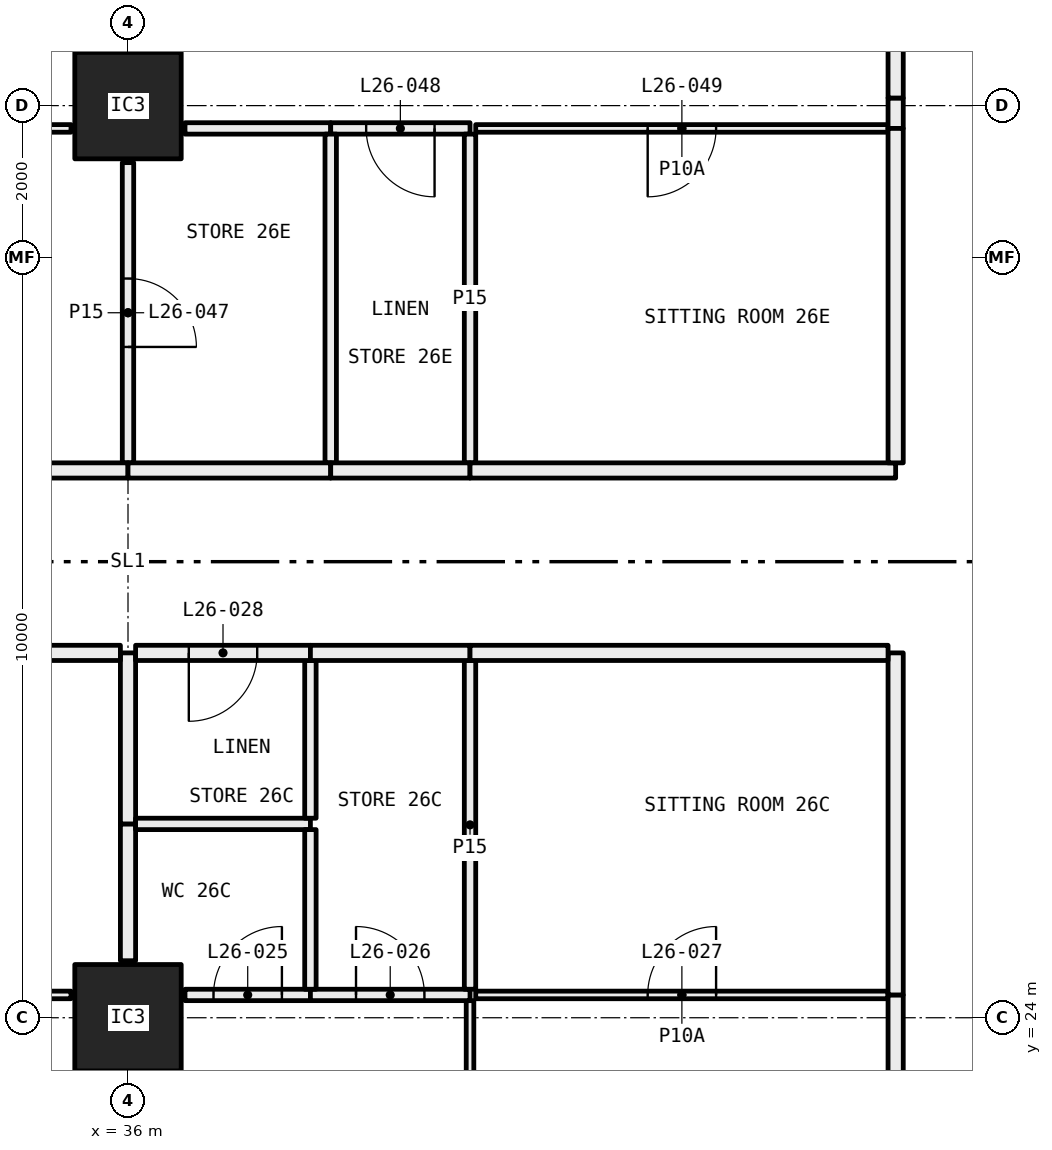
"""IFC4 building model, lengths in metres.
Left out: names, types, materials, properties, quantities, classifications, styles, units other than length and angle.
Written with IfcOpenShell. Run it as: python <this file> out.ifc"""

import sys

from ifc_helpers import new_model, si_unit, direction, frame, frame_2d, origin, origin_2d, place, context, subcontext, project, spatial, rectangle, hollow_rectangle, extrude, element, fill, save


model = new_model("IFC4")
c1 = context("Model", 3, precision=1e-05, world=origin(), true_north=direction((0.0, 1.0)))
c2 = subcontext(c1, "Body", "Model", "MODEL_VIEW")
j1 = project(units=[si_unit("LENGTHUNIT", "METRE"), si_unit("PLANEANGLEUNIT", "RADIAN")], contexts=[c1])
p1 = place(None, origin())
s1 = spatial("IfcSite", under=j1, at=p1, CompositionType="ELEMENT")
p2 = place(p1, origin())
s2 = spatial("IfcBuilding", under=s1, at=p2, CompositionType="ELEMENT")
p3 = place(p2, frame((0.0, 0.0, 103.5)))
s3 = spatial("IfcBuildingStorey", under=s2, at=p3, CompositionType="ELEMENT", Elevation=103.5)
for number, where, z_axis, x_axis in (
    (1, (36.0, 24.0, 0.0), (0.0, 0.0, 1.0), (1.0, 0.0, 0.0)),
    (2, (36.0, 36.0, 0.0), (0.0, 0.0, 1.0), (1.0, 0.0, 0.0)),
):
    element("IfcColumn", number, at=place(p3, frame(where, z_axis=z_axis, x_axis=x_axis)), inside=s3, PredefinedType="COLUMN", context=c2, shape_type="SweptSolid", body=[
        extrude(hollow_rectangle(XDim=1.4, YDim=1.4, WallThickness=0.06, at=origin_2d()), origin(), (0.0, 0.0, 1.0), 3.05),
    ])
p4 = place(p3, frame((35.25, 24.3, 0.0), z_axis=(0.0, 0.0, 1.0), x_axis=(-1.0, 0.0, 0.0)))
e3 = element("IfcWall", 3, at=p4, inside=s3, PredefinedType="PARTITIONING", context=c2, shape_type="SweptSolid", body=[
    extrude(rectangle(XDim=3.7, YDim=0.1, at=frame_2d((1.85, 0.0))), origin(), (0.0, 0.0, 1.0), 3.05),
])
p5 = place(p4, frame((1.4, 0.0, 0.0)))
e4 = element("IfcOpeningElement", 4, at=p5, cuts=e3, PredefinedType="OPENING", context=c2, shape_type="SweptSolid", body=[
    extrude(rectangle(XDim=0.9, YDim=2.1, at=frame_2d((0.45, 1.05))), frame((0.0, 0.06, 0.0), z_axis=(0.0, -1.0, 0.0), x_axis=(1.0, 0.0, 0.0)), (0.0, 0.0, 1.0), 0.12),
])
p6 = place(p3, frame((36.0, 24.75, 0.0), z_axis=(0.0, 0.0, 1.0), x_axis=(0.0, 1.0, 0.0)))
e5 = element("IfcWall", 5, at=p6, inside=s3, PredefinedType="PARTITIONING", context=c2, shape_type="SweptSolid", body=[
    extrude(rectangle(XDim=1.8, YDim=0.2, at=frame_2d((0.9, 0.0))), origin(), (0.0, 0.0, 1.0), 2.45),
])
p7 = place(p3, frame((36.0, 26.55, 0.0), z_axis=(0.0, 0.0, 1.0), x_axis=(0.0, 1.0, 0.0)))
e6 = element("IfcWall", 6, at=p7, inside=s3, PredefinedType="PARTITIONING", context=c2, shape_type="SweptSolid", body=[
    extrude(rectangle(XDim=2.25, YDim=0.2, at=frame_2d((1.125, 0.0))), origin(), (0.0, 0.0, 1.0), 2.45),
])
p8 = place(p3, frame((35.9, 28.8, 0.0), z_axis=(0.0, 0.0, 1.0), x_axis=(-1.0, 0.0, 0.0)))
e7 = element("IfcWall", 7, at=p8, inside=s3, PredefinedType="PARTITIONING", context=c2, shape_type="SweptSolid", body=[
    extrude(rectangle(XDim=5.9, YDim=0.2, at=frame_2d((2.95, 0.0))), origin(), (0.0, 0.0, 1.0), 3.05),
])
p9 = place(p3, frame((40.5, 18.075, 0.0), z_axis=(0.0, 0.0, 1.0), x_axis=(0.0, 1.0, 0.0)))
e8 = element("IfcWall", 8, at=p9, inside=s3, PredefinedType="PARTITIONING", context=c2, shape_type="SweptSolid", body=[
    extrude(rectangle(XDim=6.15, YDim=0.1, at=frame_2d((3.075, 0.0))), origin(), (0.0, 0.0, 1.0), 2.45),
])
p10 = place(p9, frame((2.625, 0.0, 0.0)))
e9 = element("IfcOpeningElement", 9, at=p10, cuts=e8, PredefinedType="OPENING", context=c2, shape_type="SweptSolid", body=[
    extrude(rectangle(XDim=0.9, YDim=2.1, at=frame_2d((0.45, 1.05))), frame((0.0, 0.06, 0.0), z_axis=(0.0, -1.0, 0.0), x_axis=(1.0, 0.0, 0.0)), (0.0, 0.0, 1.0), 0.12),
])
p11 = place(p3, frame((38.4, 24.3, 0.0), z_axis=(0.0, 0.0, 1.0), x_axis=(-1.0, 0.0, 0.0)))
e10 = element("IfcWall", 10, at=p11, inside=s3, PredefinedType="PARTITIONING", context=c2, shape_type="SweptSolid", body=[
    extrude(rectangle(XDim=1.65, YDim=0.15, at=frame_2d((0.825, 0.0))), origin(), (0.0, 0.0, 1.0), 3.05),
])
p12 = place(p11, frame((0.375, 0.0, 0.0)))
e11 = element("IfcOpeningElement", 11, at=p12, cuts=e10, PredefinedType="OPENING", context=c2, shape_type="SweptSolid", body=[
    extrude(rectangle(XDim=0.9, YDim=2.1, at=frame_2d((0.45, 1.05))), frame((0.0, 0.085, 0.0), z_axis=(0.0, -1.0, 0.0), x_axis=(1.0, 0.0, 0.0)), (0.0, 0.0, 1.0), 0.17),
])
p13 = place(p3, frame((40.5, 24.3, 0.0), z_axis=(0.0, 0.0, 1.0), x_axis=(-1.0, 0.0, 0.0)))
e12 = element("IfcWall", 12, at=p13, inside=s3, PredefinedType="PARTITIONING", context=c2, shape_type="SweptSolid", body=[
    extrude(rectangle(XDim=2.1, YDim=0.15, at=frame_2d((1.05, 0.0))), origin(), (0.0, 0.0, 1.0), 3.05),
])
p14 = place(p13, frame((0.6, 0.0, 0.0)))
e13 = element("IfcOpeningElement", 13, at=p14, cuts=e12, PredefinedType="OPENING", context=c2, shape_type="SweptSolid", body=[
    extrude(rectangle(XDim=0.9, YDim=2.1, at=frame_2d((0.45, 1.05))), frame((0.0, 0.085, 0.0), z_axis=(0.0, -1.0, 0.0), x_axis=(1.0, 0.0, 0.0)), (0.0, 0.0, 1.0), 0.17),
])
p15 = place(p3, frame((46.0, 24.3, 0.0), z_axis=(0.0, 0.0, 1.0), x_axis=(-1.0, 0.0, 0.0)))
e14 = element("IfcWall", 14, at=p15, inside=s3, PredefinedType="PARTITIONING", context=c2, shape_type="SweptSolid", body=[
    extrude(rectangle(XDim=5.425, YDim=0.1, at=frame_2d((2.712, 0.0))), origin(), (0.0, 0.0, 1.0), 3.05),
])
p16 = place(p15, frame((2.262, 0.0, 0.0)))
e15 = element("IfcOpeningElement", 15, at=p16, cuts=e14, PredefinedType="OPENING", context=c2, shape_type="SweptSolid", body=[
    extrude(rectangle(XDim=0.9, YDim=2.1, at=frame_2d((0.45, 1.05))), frame((0.0, 0.06, 0.0), z_axis=(0.0, -1.0, 0.0), x_axis=(1.0, 0.0, 0.0)), (0.0, 0.0, 1.0), 0.12),
])
p17 = place(p3, frame((46.1, 18.1, 0.0), z_axis=(0.0, 0.0, 1.0), x_axis=(0.0, 1.0, 0.0)))
e16 = element("IfcWall", 16, at=p17, inside=s3, PredefinedType="PARTITIONING", context=c2, shape_type="SweptSolid", body=[
    extrude(rectangle(XDim=6.2, YDim=0.2, at=frame_2d((3.1, 0.0))), origin(), (0.0, 0.0, 1.0), 2.45),
])
p18 = place(p3, frame((38.4, 26.55, 0.0), z_axis=(0.0, 0.0, 1.0), x_axis=(-1.0, 0.0, 0.0)))
e17 = element("IfcWall", 17, at=p18, inside=s3, PredefinedType="PARTITIONING", context=c2, shape_type="SweptSolid", body=[
    extrude(rectangle(XDim=2.3, YDim=0.15, at=frame_2d((1.15, 0.0))), origin(), (0.0, 0.0, 1.0), 3.05),
])
p19 = place(p3, frame((38.4, 24.375, 0.0), z_axis=(0.0, 0.0, 1.0), x_axis=(0.0, 1.0, 0.0)))
e18 = element("IfcWall", 18, at=p19, inside=s3, PredefinedType="PARTITIONING", context=c2, shape_type="SweptSolid", body=[
    extrude(rectangle(XDim=2.1, YDim=0.15, at=frame_2d((1.05, 0.0))), origin(), (0.0, 0.0, 1.0), 3.05),
])
p20 = place(p3, frame((38.4, 26.625, 0.0), z_axis=(0.0, 0.0, 1.0), x_axis=(0.0, 1.0, 0.0)))
e19 = element("IfcWall", 19, at=p20, inside=s3, PredefinedType="PARTITIONING", context=c2, shape_type="SweptSolid", body=[
    extrude(rectangle(XDim=2.075, YDim=0.15, at=frame_2d((1.038, 0.0))), origin(), (0.0, 0.0, 1.0), 3.05),
])
p21 = place(p3, frame((38.4, 28.8, 0.0), z_axis=(0.0, 0.0, 1.0), x_axis=(-1.0, 0.0, 0.0)))
e20 = element("IfcWall", 20, at=p21, inside=s3, PredefinedType="PARTITIONING", context=c2, shape_type="SweptSolid", body=[
    extrude(rectangle(XDim=2.3, YDim=0.2, at=frame_2d((1.15, 0.0))), origin(), (0.0, 0.0, 1.0), 3.05),
])
p22 = place(p21, frame((0.7, 0.0, 0.0)))
e21 = element("IfcOpeningElement", 21, at=p22, cuts=e20, PredefinedType="OPENING", context=c2, shape_type="SweptSolid", body=[
    extrude(rectangle(XDim=0.9, YDim=2.1, at=frame_2d((0.45, 1.05))), frame((0.0, 0.11, 0.0), z_axis=(0.0, -1.0, 0.0), x_axis=(1.0, 0.0, 0.0)), (0.0, 0.0, 1.0), 0.22),
])
p23 = place(p3, frame((40.5, 24.375, 0.0), z_axis=(0.0, 0.0, 1.0), x_axis=(0.0, 1.0, 0.0)))
e22 = element("IfcWall", 22, at=p23, inside=s3, PredefinedType="PARTITIONING", context=c2, shape_type="SweptSolid", body=[
    extrude(rectangle(XDim=4.325, YDim=0.15, at=frame_2d((2.163, 0.0))), origin(), (0.0, 0.0, 1.0), 3.05),
])
p24 = place(p3, frame((40.5, 28.8, 0.0), z_axis=(0.0, 0.0, 1.0), x_axis=(-1.0, 0.0, 0.0)))
e23 = element("IfcWall", 23, at=p24, inside=s3, PredefinedType="PARTITIONING", context=c2, shape_type="SweptSolid", body=[
    extrude(rectangle(XDim=2.1, YDim=0.2, at=frame_2d((1.05, 0.0))), origin(), (0.0, 0.0, 1.0), 3.05),
])
p25 = place(p3, frame((46.1, 24.3, 0.0), z_axis=(0.0, 0.0, 1.0), x_axis=(0.0, 1.0, 0.0)))
e24 = element("IfcWall", 24, at=p25, inside=s3, PredefinedType="PARTITIONING", context=c2, shape_type="SweptSolid", body=[
    extrude(rectangle(XDim=4.5, YDim=0.2, at=frame_2d((2.25, 0.0))), origin(), (0.0, 0.0, 1.0), 3.05),
])
p26 = place(p3, frame((46.0, 28.8, 0.0), z_axis=(0.0, 0.0, 1.0), x_axis=(-1.0, 0.0, 0.0)))
e25 = element("IfcWall", 25, at=p26, inside=s3, PredefinedType="PARTITIONING", context=c2, shape_type="SweptSolid", body=[
    extrude(rectangle(XDim=5.5, YDim=0.2, at=frame_2d((2.75, 0.0))), origin(), (0.0, 0.0, 1.0), 3.05),
])
p27 = place(p3, frame((31.55, 35.7, 0.0), z_axis=(0.0, 0.0, 1.0), x_axis=(1.0, 0.0, 0.0)))
e26 = element("IfcWall", 26, at=p27, inside=s3, PredefinedType="PARTITIONING", context=c2, shape_type="SweptSolid", body=[
    extrude(rectangle(XDim=3.7, YDim=0.1, at=frame_2d((1.85, 0.0))), origin(), (0.0, 0.0, 1.0), 3.05),
])
p28 = place(p27, frame((1.4, 0.0, 0.0)))
e27 = element("IfcOpeningElement", 27, at=p28, cuts=e26, PredefinedType="OPENING", context=c2, shape_type="SweptSolid", body=[
    extrude(rectangle(XDim=0.9, YDim=2.1, at=frame_2d((0.45, 1.05))), frame((0.0, 0.06, 0.0), z_axis=(0.0, -1.0, 0.0), x_axis=(1.0, 0.0, 0.0)), (0.0, 0.0, 1.0), 0.12),
])
p29 = place(p3, frame((36.0, 31.3, 0.0), z_axis=(0.0, 0.0, 1.0), x_axis=(0.0, 1.0, 0.0)))
e28 = element("IfcWall", 28, at=p29, inside=s3, PredefinedType="PARTITIONING", context=c2, shape_type="SweptSolid", body=[
    extrude(rectangle(XDim=3.95, YDim=0.15, at=frame_2d((1.975, 0.0))), origin(), (0.0, 0.0, 1.0), 2.45),
])
p30 = place(p29, frame((1.525, 0.0, 0.0)))
e29 = element("IfcOpeningElement", 29, at=p30, cuts=e28, PredefinedType="OPENING", context=c2, shape_type="SweptSolid", body=[
    extrude(rectangle(XDim=0.9, YDim=2.1, at=frame_2d((0.45, 1.05))), frame((0.0, 0.085, 0.0), z_axis=(0.0, -1.0, 0.0), x_axis=(1.0, 0.0, 0.0)), (0.0, 0.0, 1.0), 0.17),
])
p31 = place(p3, frame((30.0, 31.2, 0.0), z_axis=(0.0, 0.0, 1.0), x_axis=(1.0, 0.0, 0.0)))
e30 = element("IfcWall", 30, at=p31, inside=s3, PredefinedType="PARTITIONING", context=c2, shape_type="SweptSolid", body=[
    extrude(rectangle(XDim=6.0, YDim=0.2, at=frame_2d((3.0, 0.0))), origin(), (0.0, 0.0, 1.0), 2.45),
])
p32 = place(p3, frame((36.75, 35.7, 0.0), z_axis=(0.0, 0.0, 1.0), x_axis=(1.0, 0.0, 0.0)))
e31 = element("IfcWall", 31, at=p32, inside=s3, PredefinedType="PARTITIONING", context=c2, shape_type="SweptSolid", body=[
    extrude(rectangle(XDim=1.917, YDim=0.15, at=frame_2d((0.958, 0.0))), origin(), (0.0, 0.0, 1.0), 3.05),
])
p33 = place(p3, frame((38.667, 35.7, 0.0), z_axis=(0.0, 0.0, 1.0), x_axis=(1.0, 0.0, 0.0)))
e32 = element("IfcWall", 32, at=p33, inside=s3, PredefinedType="PARTITIONING", context=c2, shape_type="SweptSolid", body=[
    extrude(rectangle(XDim=1.833, YDim=0.15, at=frame_2d((0.917, 0.0))), origin(), (0.0, 0.0, 1.0), 3.05),
])
p34 = place(p33, frame((0.467, 0.0, 0.0)))
e33 = element("IfcOpeningElement", 33, at=p34, cuts=e32, PredefinedType="OPENING", context=c2, shape_type="SweptSolid", body=[
    extrude(rectangle(XDim=0.9, YDim=2.1, at=frame_2d((0.45, 1.05))), frame((0.0, 0.085, 0.0), z_axis=(0.0, -1.0, 0.0), x_axis=(1.0, 0.0, 0.0)), (0.0, 0.0, 1.0), 0.17),
])
p35 = place(p3, frame((40.575, 35.7, 0.0), z_axis=(0.0, 0.0, 1.0), x_axis=(1.0, 0.0, 0.0)))
e34 = element("IfcWall", 34, at=p35, inside=s3, PredefinedType="PARTITIONING", context=c2, shape_type="SweptSolid", body=[
    extrude(rectangle(XDim=5.425, YDim=0.1, at=frame_2d((2.712, 0.0))), origin(), (0.0, 0.0, 1.0), 3.05),
])
p36 = place(p35, frame((2.262, 0.0, 0.0)))
e35 = element("IfcOpeningElement", 35, at=p36, cuts=e34, PredefinedType="OPENING", context=c2, shape_type="SweptSolid", body=[
    extrude(rectangle(XDim=0.9, YDim=2.1, at=frame_2d((0.45, 1.05))), frame((0.0, 0.06, 0.0), z_axis=(0.0, -1.0, 0.0), x_axis=(1.0, 0.0, 0.0)), (0.0, 0.0, 1.0), 0.12),
])
p37 = place(p3, frame((46.1, 35.7, 0.0), z_axis=(0.0, 0.0, 1.0), x_axis=(0.0, 1.0, 0.0)))
e36 = element("IfcWall", 36, at=p37, inside=s3, PredefinedType="PARTITIONING", context=c2, shape_type="SweptSolid", body=[
    extrude(rectangle(XDim=0.4, YDim=0.2, at=frame_2d((0.2, 0.0))), origin(), (0.0, 0.0, 1.0), 2.45),
])
p38 = place(p3, frame((46.1, 36.1, 0.0), z_axis=(0.0, 0.0, 1.0), x_axis=(0.0, 1.0, 0.0)))
e37 = element("IfcWall", 37, at=p38, inside=s3, PredefinedType="PARTITIONING", context=c2, shape_type="SweptSolid", body=[
    extrude(rectangle(XDim=5.8, YDim=0.2, at=frame_2d((2.9, 0.0))), origin(), (0.0, 0.0, 1.0), 3.05),
])
p39 = place(p3, frame((38.667, 31.3, 0.0), z_axis=(0.0, 0.0, 1.0), x_axis=(0.0, 1.0, 0.0)))
e38 = element("IfcWall", 38, at=p39, inside=s3, PredefinedType="PARTITIONING", context=c2, shape_type="SweptSolid", body=[
    extrude(rectangle(XDim=4.325, YDim=0.15, at=frame_2d((2.163, 0.0))), origin(), (0.0, 0.0, 1.0), 3.05),
])
p40 = place(p3, frame((36.0, 31.2, 0.0), z_axis=(0.0, 0.0, 1.0), x_axis=(1.0, 0.0, 0.0)))
e39 = element("IfcWall", 39, at=p40, inside=s3, PredefinedType="PARTITIONING", context=c2, shape_type="SweptSolid", body=[
    extrude(rectangle(XDim=2.667, YDim=0.2, at=frame_2d((1.333, 0.0))), origin(), (0.0, 0.0, 1.0), 2.45),
])
p41 = place(p3, frame((40.5, 31.3, 0.0), z_axis=(0.0, 0.0, 1.0), x_axis=(0.0, 1.0, 0.0)))
e40 = element("IfcWall", 40, at=p41, inside=s3, PredefinedType="PARTITIONING", context=c2, shape_type="SweptSolid", body=[
    extrude(rectangle(XDim=4.325, YDim=0.15, at=frame_2d((2.163, 0.0))), origin(), (0.0, 0.0, 1.0), 3.05),
])
p42 = place(p3, frame((38.667, 31.2, 0.0), z_axis=(0.0, 0.0, 1.0), x_axis=(1.0, 0.0, 0.0)))
e41 = element("IfcWall", 41, at=p42, inside=s3, PredefinedType="PARTITIONING", context=c2, shape_type="SweptSolid", body=[
    extrude(rectangle(XDim=1.833, YDim=0.2, at=frame_2d((0.917, 0.0))), origin(), (0.0, 0.0, 1.0), 3.05),
])
p43 = place(p3, frame((40.5, 31.2, 0.0), z_axis=(0.0, 0.0, 1.0), x_axis=(1.0, 0.0, 0.0)))
e42 = element("IfcWall", 42, at=p43, inside=s3, PredefinedType="PARTITIONING", context=c2, shape_type="SweptSolid", body=[
    extrude(rectangle(XDim=5.6, YDim=0.2, at=frame_2d((2.8, 0.0))), origin(), (0.0, 0.0, 1.0), 3.05),
])
p44 = place(p3, frame((46.1, 31.3, 0.0), z_axis=(0.0, 0.0, 1.0), x_axis=(0.0, 1.0, 0.0)))
e43 = element("IfcWall", 43, at=p44, inside=s3, PredefinedType="PARTITIONING", context=c2, shape_type="SweptSolid", body=[
    extrude(rectangle(XDim=4.4, YDim=0.2, at=frame_2d((2.2, 0.0))), origin(), (0.0, 0.0, 1.0), 3.05),
])
p45 = place(p12, frame((0.9, 0.0, 0.0), x_axis=(-1.0, 0.0, 0.0)))
e44 = element("IfcDoor", 44, at=p45, inside=s3, OperationType="SINGLE_SWING_LEFT", PredefinedType="DOOR", context=c2, shape_type="SweptSolid", body=[
    extrude(rectangle(XDim=0.9, YDim=2.1, at=frame_2d((0.45, 1.05))), frame((0.0, 0.025, 0.0), z_axis=(0.0, -1.0, 0.0), x_axis=(1.0, 0.0, 0.0)), (0.0, 0.0, 1.0), 0.05),
])
fill(e11, e44)
p46 = place(p14, frame((0.9, 0.0, 0.0), x_axis=(-1.0, 0.0, 0.0)))
e45 = element("IfcDoor", 45, at=p46, inside=s3, OperationType="SINGLE_SWING_RIGHT", PredefinedType="DOOR", context=c2, shape_type="SweptSolid", body=[
    extrude(rectangle(XDim=0.9, YDim=2.1, at=frame_2d((0.45, 1.05))), frame((0.0, 0.025, 0.0), z_axis=(0.0, -1.0, 0.0), x_axis=(1.0, 0.0, 0.0)), (0.0, 0.0, 1.0), 0.05),
])
fill(e13, e45)
p47 = place(p16, frame((0.9, 0.0, 0.0), x_axis=(-1.0, 0.0, 0.0)))
e46 = element("IfcDoor", 46, at=p47, inside=s3, OperationType="SINGLE_SWING_LEFT", PredefinedType="DOOR", context=c2, shape_type="SweptSolid", body=[
    extrude(rectangle(XDim=0.9, YDim=2.1, at=frame_2d((0.45, 1.05))), frame((0.0, 0.025, 0.0), z_axis=(0.0, -1.0, 0.0), x_axis=(1.0, 0.0, 0.0)), (0.0, 0.0, 1.0), 0.05),
])
fill(e15, e46)
p48 = place(p22, origin())
e47 = element("IfcDoor", 47, at=p48, inside=s3, OperationType="SINGLE_SWING_LEFT", PredefinedType="DOOR", context=c2, shape_type="SweptSolid", body=[
    extrude(rectangle(XDim=0.9, YDim=2.1, at=frame_2d((0.45, 1.05))), frame((0.0, 0.025, 0.0), z_axis=(0.0, -1.0, 0.0), x_axis=(1.0, 0.0, 0.0)), (0.0, 0.0, 1.0), 0.05),
])
fill(e21, e47)
p49 = place(p30, frame((0.9, 0.0, 0.0), x_axis=(-1.0, 0.0, 0.0)))
e48 = element("IfcDoor", 48, at=p49, inside=s3, OperationType="SINGLE_SWING_LEFT", PredefinedType="DOOR", context=c2, shape_type="SweptSolid", body=[
    extrude(rectangle(XDim=0.9, YDim=2.1, at=frame_2d((0.45, 1.05))), frame((0.0, 0.025, 0.0), z_axis=(0.0, -1.0, 0.0), x_axis=(1.0, 0.0, 0.0)), (0.0, 0.0, 1.0), 0.05),
])
fill(e29, e48)
p50 = place(p34, frame((0.9, 0.0, 0.0), x_axis=(-1.0, 0.0, 0.0)))
e49 = element("IfcDoor", 49, at=p50, inside=s3, OperationType="SINGLE_SWING_RIGHT", PredefinedType="DOOR", context=c2, shape_type="SweptSolid", body=[
    extrude(rectangle(XDim=0.9, YDim=2.1, at=frame_2d((0.45, 1.05))), frame((0.0, 0.025, 0.0), z_axis=(0.0, -1.0, 0.0), x_axis=(1.0, 0.0, 0.0)), (0.0, 0.0, 1.0), 0.05),
])
fill(e33, e49)
p51 = place(p36, frame((0.9, 0.0, 0.0), x_axis=(-1.0, 0.0, 0.0)))
e50 = element("IfcDoor", 50, at=p51, inside=s3, OperationType="SINGLE_SWING_LEFT", PredefinedType="DOOR", context=c2, shape_type="SweptSolid", body=[
    extrude(rectangle(XDim=0.9, YDim=2.1, at=frame_2d((0.45, 1.05))), frame((0.0, 0.025, 0.0), z_axis=(0.0, -1.0, 0.0), x_axis=(1.0, 0.0, 0.0)), (0.0, 0.0, 1.0), 0.05),
])
fill(e35, e50)
save(model, sys.argv[1])
